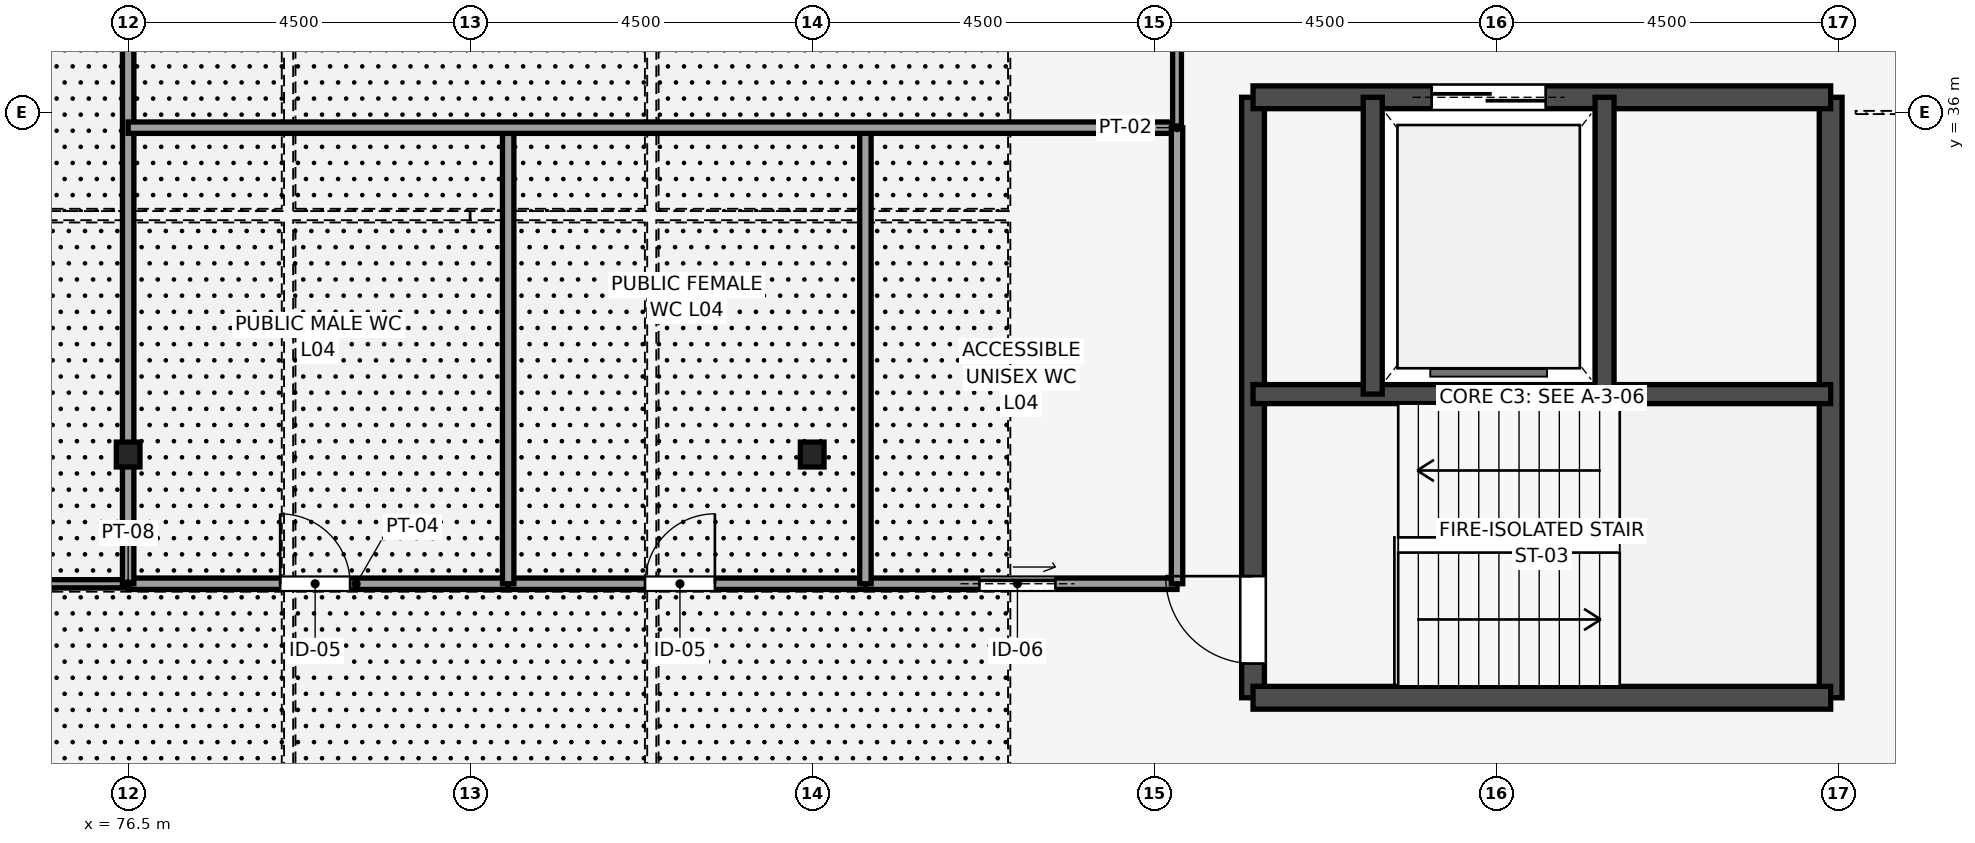
"""IFC4 building model, lengths in metres.
Left out: names, types, materials, properties, quantities, classifications, styles, units other than length and angle.
Written with IfcOpenShell. Run it as: python <this file> out.ifc"""

import sys

from ifc_helpers import new_model, si_unit, direction, frame, frame_2d, origin, origin_2d, place, context, subcontext, project, spatial, rectangle, i_section, extrude, element, fill, save


model = new_model("IFC4")
c1 = context("Model", 3, precision=1e-05, world=origin(), true_north=direction((0.0, 1.0)))
c2 = subcontext(c1, "Body", "Model", "MODEL_VIEW")
j1 = project(units=[si_unit("LENGTHUNIT", "METRE"), si_unit("PLANEANGLEUNIT", "RADIAN")], contexts=[c1])
p1 = place(None, origin())
s1 = spatial("IfcSite", under=j1, at=p1, CompositionType="ELEMENT")
p2 = place(p1, origin())
s2 = spatial("IfcBuilding", under=s1, at=p2, CompositionType="ELEMENT")
p3 = place(p2, frame((0.0, 0.0, 18.9)))
s3 = spatial("IfcBuildingStorey", under=s2, at=p3, CompositionType="ELEMENT", Elevation=18.9)
for number, where, z_axis, x_axis in (
    (1, (76.5, 31.5, 0.0), (0.0, 0.0, 1.0), (1.0, 0.0, 0.0)),
    (2, (85.5, 31.5, 0.0), (0.0, 0.0, 1.0), (1.0, 0.0, 0.0)),
):
    element("IfcColumn", number, at=place(p3, frame(where, z_axis=z_axis, x_axis=x_axis)), inside=s3, PredefinedType="COLUMN", context=c2, shape_type="SweptSolid", body=[
        extrude(i_section(OverallWidth=0.311, OverallDepth=0.327, WebThickness=0.016, FlangeThickness=0.025, FilletRadius=0.017, at=origin_2d()), origin(), (0.0, 0.0, 1.0), 4.5),
    ])
p4 = place(p3, frame((91.3, 28.3, 0.0), z_axis=(0.0, 0.0, 1.0), x_axis=(0.0, 1.0, 0.0)))
e3 = element("IfcWall", 3, at=p4, inside=s3, PredefinedType="SHEAR", context=c2, shape_type="SweptSolid", body=[
    extrude(rectangle(XDim=7.9, YDim=0.3, at=frame_2d((3.95, 0.0))), origin(), (0.0, 0.0, 1.0), 4.34),
])
p5 = place(p4, frame((0.45, 0.0, 0.0)))
e4 = element("IfcOpeningElement", 4, at=p5, cuts=e3, PredefinedType="OPENING", context=c2, shape_type="SweptSolid", body=[
    extrude(rectangle(XDim=1.15, YDim=2.15, at=frame_2d((0.575, 1.075))), frame((0.0, 0.16, 0.0), z_axis=(0.0, -1.0, 0.0), x_axis=(1.0, 0.0, 0.0)), (0.0, 0.0, 1.0), 0.32),
])
p6 = place(p3, frame((98.9, 28.3, 0.0), z_axis=(0.0, 0.0, 1.0), x_axis=(0.0, 1.0, 0.0)))
e5 = element("IfcWall", 5, at=p6, inside=s3, PredefinedType="SHEAR", context=c2, shape_type="SweptSolid", body=[
    extrude(rectangle(XDim=7.9, YDim=0.3, at=frame_2d((3.95, 0.0))), origin(), (0.0, 0.0, 1.0), 4.34),
])
p7 = place(p3, frame((91.3, 28.3, 0.0), z_axis=(0.0, 0.0, 1.0), x_axis=(1.0, 0.0, 0.0)))
e6 = element("IfcWall", 6, at=p7, inside=s3, PredefinedType="SHEAR", context=c2, shape_type="SweptSolid", body=[
    extrude(rectangle(XDim=7.6, YDim=0.3, at=frame_2d((3.8, 0.0))), origin(), (0.0, 0.0, 1.0), 4.34),
])
p8 = place(p3, frame((91.3, 36.2, 0.0), z_axis=(0.0, 0.0, 1.0), x_axis=(1.0, 0.0, 0.0)))
e7 = element("IfcWall", 7, at=p8, inside=s3, PredefinedType="SHEAR", context=c2, shape_type="SweptSolid", body=[
    extrude(rectangle(XDim=7.6, YDim=0.3, at=frame_2d((3.8, 0.0))), origin(), (0.0, 0.0, 1.0), 4.34),
])
p9 = place(p8, frame((2.35, 0.0, 0.0)))
e8 = element("IfcOpeningElement", 8, at=p9, cuts=e7, PredefinedType="OPENING", context=c2, shape_type="SweptSolid", body=[
    extrude(rectangle(XDim=1.5, YDim=2.4, at=frame_2d((0.75, 1.2))), frame((0.0, 0.16, 0.0), z_axis=(0.0, -1.0, 0.0), x_axis=(1.0, 0.0, 0.0)), (0.0, 0.0, 1.0), 0.32),
])
p10 = place(p3, frame((91.3, 32.295, 0.0), z_axis=(0.0, 0.0, 1.0), x_axis=(1.0, 0.0, 0.0)))
e9 = element("IfcWall", 9, at=p10, inside=s3, PredefinedType="SHEAR", context=c2, shape_type="SweptSolid", body=[
    extrude(rectangle(XDim=7.6, YDim=0.25, at=frame_2d((3.8, 0.0))), origin(), (0.0, 0.0, 1.0), 4.34),
])
for number, where, z_axis, x_axis in (
    (10, (92.875, 32.295, 0.0), (0.0, 0.0, 1.0), (0.0, 1.0, 0.0)),
    (11, (95.925, 32.295, 0.0), (0.0, 0.0, 1.0), (0.0, 1.0, 0.0)),
):
    element("IfcWall", number, at=place(p3, frame(where, z_axis=z_axis, x_axis=x_axis)), inside=s3, PredefinedType="SHEAR", context=c2, shape_type="SweptSolid", body=[
        extrude(rectangle(XDim=3.905, YDim=0.25, at=frame_2d((1.953, 0.0))), origin(), (0.0, 0.0, 1.0), 4.34),
    ])
p11 = place(p3, frame((58.5, 29.8, 0.0), z_axis=(0.0, 0.0, 1.0), x_axis=(1.0, 0.0, 0.0)))
e12 = element("IfcWall", 12, at=p11, inside=s3, PredefinedType="PARTITIONING", context=c2, shape_type="SweptSolid", body=[
    extrude(rectangle(XDim=18.0, YDim=0.108, at=frame_2d((9.0, 0.0))), origin(), (0.0, 0.0, 1.0), 4.32),
])
p12 = place(p11, frame((5.2, 0.0, 0.0)))
e13 = element("IfcOpeningElement", 13, at=p12, cuts=e12, PredefinedType="OPENING", context=c2, shape_type="SweptSolid", body=[
    extrude(rectangle(XDim=1.4, YDim=2.2, at=frame_2d((0.7, 1.1))), frame((0.0, 0.064, 0.0), z_axis=(0.0, -1.0, 0.0), x_axis=(1.0, 0.0, 0.0)), (0.0, 0.0, 1.0), 0.128),
])
p13 = place(p3, frame((76.5, 29.8, 0.0), z_axis=(0.0, 0.0, 1.0), x_axis=(1.0, 0.0, 0.0)))
e14 = element("IfcWall", 14, at=p13, inside=s3, PredefinedType="PARTITIONING", context=c2, shape_type="SweptSolid", body=[
    extrude(rectangle(XDim=5.0, YDim=0.15, at=frame_2d((2.5, 0.0))), origin(), (0.0, 0.0, 1.0), 4.32),
])
p14 = place(p13, frame((2.0, 0.0, 0.0)))
e15 = element("IfcOpeningElement", 15, at=p14, cuts=e14, PredefinedType="OPENING", context=c2, shape_type="SweptSolid", body=[
    extrude(rectangle(XDim=0.92, YDim=2.15, at=frame_2d((0.46, 1.075))), frame((0.0, 0.085, 0.0), z_axis=(0.0, -1.0, 0.0), x_axis=(1.0, 0.0, 0.0)), (0.0, 0.0, 1.0), 0.17),
])
p15 = place(p3, frame((81.5, 29.8, 0.0), z_axis=(0.0, 0.0, 1.0), x_axis=(1.0, 0.0, 0.0)))
e16 = element("IfcWall", 16, at=p15, inside=s3, PredefinedType="PARTITIONING", context=c2, shape_type="SweptSolid", body=[
    extrude(rectangle(XDim=4.7, YDim=0.15, at=frame_2d((2.35, 0.0))), origin(), (0.0, 0.0, 1.0), 4.32),
])
p16 = place(p15, frame((1.8, 0.0, 0.0)))
e17 = element("IfcOpeningElement", 17, at=p16, cuts=e16, PredefinedType="OPENING", context=c2, shape_type="SweptSolid", body=[
    extrude(rectangle(XDim=0.92, YDim=2.15, at=frame_2d((0.46, 1.075))), frame((0.0, 0.085, 0.0), z_axis=(0.0, -1.0, 0.0), x_axis=(1.0, 0.0, 0.0)), (0.0, 0.0, 1.0), 0.17),
])
p17 = place(p3, frame((86.2, 29.8, 0.0), z_axis=(0.0, 0.0, 1.0), x_axis=(1.0, 0.0, 0.0)))
e18 = element("IfcWall", 18, at=p17, inside=s3, PredefinedType="PARTITIONING", context=c2, shape_type="SweptSolid", body=[
    extrude(rectangle(XDim=4.1, YDim=0.15, at=frame_2d((2.05, 0.0))), origin(), (0.0, 0.0, 1.0), 4.32),
])
p18 = place(p17, frame((1.5, 0.0, 0.0)))
e19 = element("IfcOpeningElement", 19, at=p18, cuts=e18, PredefinedType="OPENING", context=c2, shape_type="SweptSolid", body=[
    extrude(rectangle(XDim=1.0, YDim=2.15, at=frame_2d((0.5, 1.075))), frame((0.0, 0.085, 0.0), z_axis=(0.0, -1.0, 0.0), x_axis=(1.0, 0.0, 0.0)), (0.0, 0.0, 1.0), 0.17),
])
p19 = place(p3, frame((76.5, 29.8, 0.0), z_axis=(0.0, 0.0, 1.0), x_axis=(0.0, 1.0, 0.0)))
e20 = element("IfcWall", 20, at=p19, inside=s3, PredefinedType="PARTITIONING", context=c2, shape_type="SweptSolid", body=[
    extrude(rectangle(XDim=10.7, YDim=0.15, at=frame_2d((5.35, 0.0))), origin(), (0.0, 0.0, 1.0), 3.772),
])
for number, where, z_axis, x_axis in (
    (21, (81.5, 29.8, 0.0), (0.0, 0.0, 1.0), (0.0, 1.0, 0.0)),
    (22, (86.2, 29.8, 0.0), (0.0, 0.0, 1.0), (0.0, 1.0, 0.0)),
):
    element("IfcWall", number, at=place(p3, frame(where, z_axis=z_axis, x_axis=x_axis)), inside=s3, PredefinedType="PARTITIONING", context=c2, shape_type="SweptSolid", body=[
        extrude(rectangle(XDim=6.0, YDim=0.15, at=frame_2d((3.0, 0.0))), origin(), (0.0, 0.0, 1.0), 4.32),
    ])
p20 = place(p3, frame((76.5, 35.8, 0.0), z_axis=(0.0, 0.0, 1.0), x_axis=(1.0, 0.0, 0.0)))
e23 = element("IfcWall", 23, at=p20, inside=s3, PredefinedType="PARTITIONING", context=c2, shape_type="SweptSolid", body=[
    extrude(rectangle(XDim=13.8, YDim=0.15, at=frame_2d((6.9, 0.0))), origin(), (0.0, 0.0, 1.0), 4.32),
])
p21 = place(p3, frame((90.3, 29.8, 0.0), z_axis=(0.0, 0.0, 1.0), x_axis=(0.0, 1.0, 0.0)))
e24 = element("IfcWall", 24, at=p21, inside=s3, PredefinedType="PARTITIONING", context=c2, shape_type="SweptSolid", body=[
    extrude(rectangle(XDim=6.0, YDim=0.15, at=frame_2d((3.0, 0.0))), origin(), (0.0, 0.0, 1.0), 4.32),
])
p22 = place(p3, frame((90.3, 35.8, 0.0), z_axis=(0.0, 0.0, 1.0), x_axis=(0.0, 1.0, 0.0)))
e25 = element("IfcWall", 25, at=p22, inside=s3, PredefinedType="PARTITIONING", context=c2, shape_type="SweptSolid", body=[
    extrude(rectangle(XDim=4.7, YDim=0.116, at=frame_2d((2.35, 0.0))), origin(), (0.0, 0.0, 1.0), 4.32),
])
p23 = place(p22, frame((1.8, 0.0, 0.0)))
e26 = element("IfcOpeningElement", 26, at=p23, cuts=e25, PredefinedType="OPENING", context=c2, shape_type="SweptSolid", body=[
    extrude(rectangle(XDim=0.95, YDim=2.15, at=frame_2d((0.475, 1.075))), frame((0.0, 0.068, 0.0), z_axis=(0.0, -1.0, 0.0), x_axis=(1.0, 0.0, 0.0)), (0.0, 0.0, 1.0), 0.136),
])
p24 = place(p5, origin())
e27 = element("IfcDoor", 27, at=p24, inside=s3, OperationType="SINGLE_SWING_RIGHT", PredefinedType="DOOR", context=c2, shape_type="SweptSolid", body=[
    extrude(rectangle(XDim=1.15, YDim=2.15, at=frame_2d((0.575, 1.075))), frame((0.0, 0.025, 0.0), z_axis=(0.0, -1.0, 0.0), x_axis=(1.0, 0.0, 0.0)), (0.0, 0.0, 1.0), 0.05),
])
fill(e4, e27)
p25 = place(p9, origin())
e28 = element("IfcDoor", 28, at=p25, inside=s3, OperationType="DOUBLE_DOOR_SLIDING", PredefinedType="DOOR", context=c2, shape_type="SweptSolid", body=[
    extrude(rectangle(XDim=1.5, YDim=2.4, at=frame_2d((0.75, 1.2))), frame((0.0, 0.025, 0.0), z_axis=(0.0, -1.0, 0.0), x_axis=(1.0, 0.0, 0.0)), (0.0, 0.0, 1.0), 0.05),
])
fill(e8, e28)
p26 = place(p14, origin())
e29 = element("IfcDoor", 29, at=p26, inside=s3, OperationType="SINGLE_SWING_LEFT", PredefinedType="DOOR", context=c2, shape_type="SweptSolid", body=[
    extrude(rectangle(XDim=0.92, YDim=2.15, at=frame_2d((0.46, 1.075))), frame((0.0, 0.025, 0.0), z_axis=(0.0, -1.0, 0.0), x_axis=(1.0, 0.0, 0.0)), (0.0, 0.0, 1.0), 0.05),
])
fill(e15, e29)
p27 = place(p16, origin())
e30 = element("IfcDoor", 30, at=p27, inside=s3, OperationType="SINGLE_SWING_RIGHT", PredefinedType="DOOR", context=c2, shape_type="SweptSolid", body=[
    extrude(rectangle(XDim=0.92, YDim=2.15, at=frame_2d((0.46, 1.075))), frame((0.0, 0.025, 0.0), z_axis=(0.0, -1.0, 0.0), x_axis=(1.0, 0.0, 0.0)), (0.0, 0.0, 1.0), 0.05),
])
fill(e17, e30)
p28 = place(p18, origin())
e31 = element("IfcDoor", 31, at=p28, inside=s3, OperationType="SLIDING_TO_LEFT", PredefinedType="DOOR", context=c2, shape_type="SweptSolid", body=[
    extrude(rectangle(XDim=1.0, YDim=2.15, at=frame_2d((0.5, 1.075))), frame((0.0, 0.025, 0.0), z_axis=(0.0, -1.0, 0.0), x_axis=(1.0, 0.0, 0.0)), (0.0, 0.0, 1.0), 0.05),
])
fill(e19, e31)
save(model, sys.argv[1])
